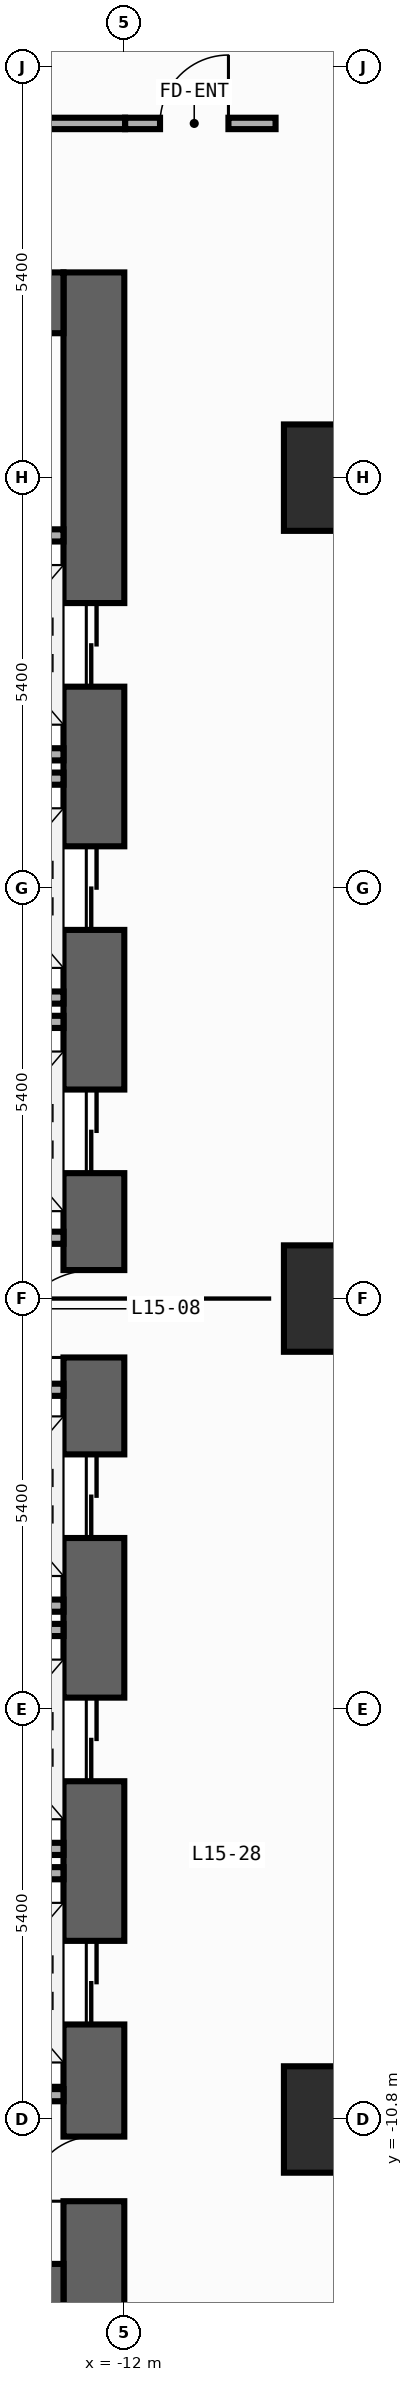
"""IFC4 building model, lengths in metres.
Left out: names, types, materials, properties, quantities, classifications, styles, units other than length and angle.
Written with IfcOpenShell. Run it as: python <this file> out.ifc"""

import sys

from ifc_helpers import new_model, si_unit, direction, frame, frame_2d, origin, origin_2d, place, context, subcontext, project, spatial, rectangle, extrude, element, fill, save


model = new_model("IFC4")
c1 = context("Model", 3, precision=1e-05, world=origin(), true_north=direction((0.0, 1.0)))
c2 = subcontext(c1, "Body", "Model", "MODEL_VIEW")
j1 = project(units=[si_unit("LENGTHUNIT", "METRE"), si_unit("PLANEANGLEUNIT", "RADIAN")], contexts=[c1])
p1 = place(None, origin())
s1 = spatial("IfcSite", under=j1, at=p1, CompositionType="ELEMENT")
p2 = place(p1, origin())
s2 = spatial("IfcBuilding", under=s1, at=p2, CompositionType="ELEMENT")
p3 = place(p2, frame((0.0, 0.0, 63.8)))
s3 = spatial("IfcBuildingStorey", under=s2, at=p3, CompositionType="ELEMENT", Elevation=63.8)
p4 = place(p3, frame((-12.4, -13.5, 0.0), z_axis=(0.0, 0.0, 1.0), x_axis=(0.0, 1.0, 0.0)))
e1 = element("IfcWall", 1, at=p4, inside=s3, PredefinedType="SHEAR", context=c2, shape_type="SweptSolid", body=[
    extrude(rectangle(XDim=27.0, YDim=0.8, at=frame_2d((13.5, 0.0))), origin(), (0.0, 0.0, 1.0), 3.94),
])
p5 = place(p4, frame((21.55, 0.0, 0.0)))
e2 = element("IfcOpeningElement", 2, at=p5, cuts=e1, PredefinedType="OPENING", context=c2, shape_type="SweptSolid", body=[
    extrude(rectangle(XDim=1.1, YDim=2.2, at=frame_2d((0.55, 1.1))), frame((0.0, 0.41, 0.0), z_axis=(0.0, -1.0, 0.0), x_axis=(1.0, 0.0, 0.0)), (0.0, 0.0, 1.0), 0.82),
])
p6 = place(p4, frame((18.35, 0.0, 0.0)))
e3 = element("IfcOpeningElement", 3, at=p6, cuts=e1, PredefinedType="OPENING", context=c2, shape_type="SweptSolid", body=[
    extrude(rectangle(XDim=1.1, YDim=2.2, at=frame_2d((0.55, 1.1))), frame((0.0, 0.41, 0.0), z_axis=(0.0, -1.0, 0.0), x_axis=(1.0, 0.0, 0.0)), (0.0, 0.0, 1.0), 0.82),
])
p7 = place(p4, frame((15.15, 0.0, 0.0)))
e4 = element("IfcOpeningElement", 4, at=p7, cuts=e1, PredefinedType="OPENING", context=c2, shape_type="SweptSolid", body=[
    extrude(rectangle(XDim=1.1, YDim=2.2, at=frame_2d((0.55, 1.1))), frame((0.0, 0.41, 0.0), z_axis=(0.0, -1.0, 0.0), x_axis=(1.0, 0.0, 0.0)), (0.0, 0.0, 1.0), 0.82),
])
p8 = place(p4, frame((10.35, 0.0, 0.0)))
e5 = element("IfcOpeningElement", 5, at=p8, cuts=e1, PredefinedType="OPENING", context=c2, shape_type="SweptSolid", body=[
    extrude(rectangle(XDim=1.1, YDim=2.2, at=frame_2d((0.55, 1.1))), frame((0.0, 0.41, 0.0), z_axis=(0.0, -1.0, 0.0), x_axis=(1.0, 0.0, 0.0)), (0.0, 0.0, 1.0), 0.82),
])
p9 = place(p4, frame((7.15, 0.0, 0.0)))
e6 = element("IfcOpeningElement", 6, at=p9, cuts=e1, PredefinedType="OPENING", context=c2, shape_type="SweptSolid", body=[
    extrude(rectangle(XDim=1.1, YDim=2.2, at=frame_2d((0.55, 1.1))), frame((0.0, 0.41, 0.0), z_axis=(0.0, -1.0, 0.0), x_axis=(1.0, 0.0, 0.0)), (0.0, 0.0, 1.0), 0.82),
])
p10 = place(p4, frame((3.95, 0.0, 0.0)))
e7 = element("IfcOpeningElement", 7, at=p10, cuts=e1, PredefinedType="OPENING", context=c2, shape_type="SweptSolid", body=[
    extrude(rectangle(XDim=1.1, YDim=2.2, at=frame_2d((0.55, 1.1))), frame((0.0, 0.41, 0.0), z_axis=(0.0, -1.0, 0.0), x_axis=(1.0, 0.0, 0.0)), (0.0, 0.0, 1.0), 0.82),
])
p11 = place(p4, frame((12.725, 0.0, 0.0)))
e8 = element("IfcOpeningElement", 8, at=p11, cuts=e1, PredefinedType="OPENING", context=c2, shape_type="SweptSolid", body=[
    extrude(rectangle(XDim=1.15, YDim=2.2, at=frame_2d((0.575, 1.1))), frame((0.0, 0.41, 0.0), z_axis=(0.0, -1.0, 0.0), x_axis=(1.0, 0.0, 0.0)), (0.0, 0.0, 1.0), 0.82),
])
p12 = place(p4, frame((1.625, 0.0, 0.0)))
e9 = element("IfcOpeningElement", 9, at=p12, cuts=e1, PredefinedType="OPENING", context=c2, shape_type="SweptSolid", body=[
    extrude(rectangle(XDim=0.85, YDim=2.1, at=frame_2d((0.425, 1.05))), frame((0.0, 0.41, 0.0), z_axis=(0.0, -1.0, 0.0), x_axis=(1.0, 0.0, 0.0)), (0.0, 0.0, 1.0), 0.82),
])
for number, where, z_axis, x_axis in (
    (10, (-19.6, -13.1, 0.0), (0.0, 0.0, 1.0), (1.0, 0.0, 0.0)),
    (11, (-19.6, 13.1, 0.0), (0.0, 0.0, 1.0), (1.0, 0.0, 0.0)),
):
    element("IfcWall", number, at=place(p3, frame(where, z_axis=z_axis, x_axis=x_axis)), inside=s3, PredefinedType="SHEAR", context=c2, shape_type="SweptSolid", body=[
        extrude(rectangle(XDim=6.8, YDim=0.8, at=frame_2d((3.4, 0.0))), origin(), (0.0, 0.0, 1.0), 3.94),
    ])
for number, where, z_axis, x_axis in (
    (12, (-9.2, -10.8, 0.0), (0.0, 0.0, 1.0), (1.0, 0.0, 0.0)),
    (13, (-9.2, 0.0, 0.0), (0.0, 0.0, 1.0), (1.0, 0.0, 0.0)),
    (14, (-9.2, 10.8, 0.0), (0.0, 0.0, 1.0), (1.0, 0.0, 0.0)),
):
    element("IfcColumn", number, at=place(p3, frame(where, z_axis=z_axis, x_axis=x_axis)), inside=s3, PredefinedType="COLUMN", context=c2, shape_type="SweptSolid", body=[
        extrude(rectangle(XDim=1.4, YDim=1.4, at=origin_2d()), origin(), (0.0, 0.0, 1.0), 4.2),
    ])
for number, where, z_axis, x_axis in (
    (15, (-14.99, 7.16, 0.0), (0.0, 0.0, 1.0), (1.0, 0.0, 0.0)),
    (16, (-14.99, 10.04, 0.0), (0.0, 0.0, 1.0), (1.0, 0.0, 0.0)),
    (17, (-14.99, 3.96, 0.0), (0.0, 0.0, 1.0), (1.0, 0.0, 0.0)),
    (18, (-14.99, 6.84, 0.0), (0.0, 0.0, 1.0), (1.0, 0.0, 0.0)),
    (19, (-14.99, 3.64, 0.0), (0.0, 0.0, 1.0), (1.0, 0.0, 0.0)),
    (20, (-14.99, -4.04, 0.0), (0.0, 0.0, 1.0), (1.0, 0.0, 0.0)),
    (21, (-14.99, -7.24, 0.0), (0.0, 0.0, 1.0), (1.0, 0.0, 0.0)),
    (22, (-14.99, -4.36, 0.0), (0.0, 0.0, 1.0), (1.0, 0.0, 0.0)),
    (23, (-14.99, -7.56, 0.0), (0.0, 0.0, 1.0), (1.0, 0.0, 0.0)),
):
    element("IfcWall", number, at=place(p3, frame(where, z_axis=z_axis, x_axis=x_axis)), inside=s3, PredefinedType="STANDARD", context=c2, shape_type="SweptSolid", body=[
        extrude(rectangle(XDim=2.19, YDim=0.16, at=frame_2d((1.095, 0.0))), origin(), (0.0, 0.0, 1.0), 3.94),
    ])
for number, where, z_axis, x_axis in (
    (24, (-15.4, 0.8, 0.0), (0.0, 0.0, 1.0), (1.0, 0.0, 0.0)),
    (25, (-15.4, -1.2, 0.0), (0.0, 0.0, 1.0), (1.0, 0.0, 0.0)),
    (26, (-15.4, -10.48, 0.0), (0.0, 0.0, 1.0), (1.0, 0.0, 0.0)),
):
    element("IfcWall", number, at=place(p3, frame(where, z_axis=z_axis, x_axis=x_axis)), inside=s3, PredefinedType="STANDARD", context=c2, shape_type="SweptSolid", body=[
        extrude(rectangle(XDim=2.6, YDim=0.16, at=frame_2d((1.3, 0.0))), origin(), (0.0, 0.0, 1.0), 3.94),
    ])
p13 = place(p3, frame((-11.99, 15.46, 0.0), z_axis=(0.0, 0.0, 1.0), x_axis=(1.0, 0.0, 0.0)))
e27 = element("IfcWall", 27, at=p13, inside=s3, PredefinedType="PARTITIONING", context=c2, shape_type="SweptSolid", body=[
    extrude(rectangle(XDim=1.98, YDim=0.15, at=frame_2d((0.99, 0.0))), origin(), (0.0, 0.0, 1.0), 3.94),
])
p14 = place(p13, frame((0.46, 0.0, 0.0)))
e28 = element("IfcOpeningElement", 28, at=p14, cuts=e27, PredefinedType="OPENING", context=c2, shape_type="SweptSolid", body=[
    extrude(rectangle(XDim=0.9, YDim=2.15, at=frame_2d((0.45, 1.075))), frame((0.0, 0.085, 0.0), z_axis=(0.0, -1.0, 0.0), x_axis=(1.0, 0.0, 0.0)), (0.0, 0.0, 1.0), 0.17),
])
p15 = place(p3, frame((-20.64, 15.46, 0.0), z_axis=(0.0, 0.0, 1.0), x_axis=(1.0, 0.0, 0.0)))
e29 = element("IfcWall", 29, at=p15, inside=s3, PredefinedType="PARTITIONING", context=c2, shape_type="SweptSolid", body=[
    extrude(rectangle(XDim=8.65, YDim=0.15, at=frame_2d((4.325, 0.0))), origin(), (0.0, 0.0, 1.0), 3.94),
])
p16 = place(p15, frame((2.871, 0.0, 0.0)))
e30 = element("IfcOpeningElement", 30, at=p16, cuts=e29, PredefinedType="OPENING", context=c2, shape_type="SweptSolid", body=[
    extrude(rectangle(XDim=0.9, YDim=2.15, at=frame_2d((0.45, 1.075))), frame((0.0, 0.085, 0.0), z_axis=(0.0, -1.0, 0.0), x_axis=(1.0, 0.0, 0.0)), (0.0, 0.0, 1.0), 0.17),
])
p17 = place(p5, origin())
e31 = element("IfcDoor", 31, at=p17, inside=s3, OperationType="DOUBLE_DOOR_SLIDING", PredefinedType="DOOR", context=c2, shape_type="SweptSolid", body=[
    extrude(rectangle(XDim=1.1, YDim=2.2, at=frame_2d((0.55, 1.1))), frame((0.0, 0.025, 0.0), z_axis=(0.0, -1.0, 0.0), x_axis=(1.0, 0.0, 0.0)), (0.0, 0.0, 1.0), 0.05),
])
fill(e2, e31)
p18 = place(p6, origin())
e32 = element("IfcDoor", 32, at=p18, inside=s3, OperationType="DOUBLE_DOOR_SLIDING", PredefinedType="DOOR", context=c2, shape_type="SweptSolid", body=[
    extrude(rectangle(XDim=1.1, YDim=2.2, at=frame_2d((0.55, 1.1))), frame((0.0, 0.025, 0.0), z_axis=(0.0, -1.0, 0.0), x_axis=(1.0, 0.0, 0.0)), (0.0, 0.0, 1.0), 0.05),
])
fill(e3, e32)
p19 = place(p7, origin())
e33 = element("IfcDoor", 33, at=p19, inside=s3, OperationType="DOUBLE_DOOR_SLIDING", PredefinedType="DOOR", context=c2, shape_type="SweptSolid", body=[
    extrude(rectangle(XDim=1.1, YDim=2.2, at=frame_2d((0.55, 1.1))), frame((0.0, 0.025, 0.0), z_axis=(0.0, -1.0, 0.0), x_axis=(1.0, 0.0, 0.0)), (0.0, 0.0, 1.0), 0.05),
])
fill(e4, e33)
p20 = place(p8, origin())
e34 = element("IfcDoor", 34, at=p20, inside=s3, OperationType="DOUBLE_DOOR_SLIDING", PredefinedType="DOOR", context=c2, shape_type="SweptSolid", body=[
    extrude(rectangle(XDim=1.1, YDim=2.2, at=frame_2d((0.55, 1.1))), frame((0.0, 0.025, 0.0), z_axis=(0.0, -1.0, 0.0), x_axis=(1.0, 0.0, 0.0)), (0.0, 0.0, 1.0), 0.05),
])
fill(e5, e34)
p21 = place(p9, origin())
e35 = element("IfcDoor", 35, at=p21, inside=s3, OperationType="DOUBLE_DOOR_SLIDING", PredefinedType="DOOR", context=c2, shape_type="SweptSolid", body=[
    extrude(rectangle(XDim=1.1, YDim=2.2, at=frame_2d((0.55, 1.1))), frame((0.0, 0.025, 0.0), z_axis=(0.0, -1.0, 0.0), x_axis=(1.0, 0.0, 0.0)), (0.0, 0.0, 1.0), 0.05),
])
fill(e6, e35)
p22 = place(p10, origin())
e36 = element("IfcDoor", 36, at=p22, inside=s3, OperationType="DOUBLE_DOOR_SLIDING", PredefinedType="DOOR", context=c2, shape_type="SweptSolid", body=[
    extrude(rectangle(XDim=1.1, YDim=2.2, at=frame_2d((0.55, 1.1))), frame((0.0, 0.025, 0.0), z_axis=(0.0, -1.0, 0.0), x_axis=(1.0, 0.0, 0.0)), (0.0, 0.0, 1.0), 0.05),
])
fill(e7, e36)
p23 = place(p11, origin())
e37 = element("IfcDoor", 37, at=p23, inside=s3, OperationType="SINGLE_SWING_LEFT", PredefinedType="DOOR", context=c2, shape_type="SweptSolid", body=[
    extrude(rectangle(XDim=1.15, YDim=2.2, at=frame_2d((0.575, 1.1))), frame((0.0, 0.025, 0.0), z_axis=(0.0, -1.0, 0.0), x_axis=(1.0, 0.0, 0.0)), (0.0, 0.0, 1.0), 0.05),
])
fill(e8, e37)
p24 = place(p12, origin())
e38 = element("IfcDoor", 38, at=p24, inside=s3, OperationType="SINGLE_SWING_LEFT", PredefinedType="DOOR", context=c2, shape_type="SweptSolid", body=[
    extrude(rectangle(XDim=0.85, YDim=2.1, at=frame_2d((0.425, 1.05))), frame((0.0, 0.025, 0.0), z_axis=(0.0, -1.0, 0.0), x_axis=(1.0, 0.0, 0.0)), (0.0, 0.0, 1.0), 0.05),
])
fill(e9, e38)
p25 = place(p14, origin())
e39 = element("IfcDoor", 39, at=p25, inside=s3, OperationType="SINGLE_SWING_RIGHT", PredefinedType="DOOR", context=c2, shape_type="SweptSolid", body=[
    extrude(rectangle(XDim=0.9, YDim=2.15, at=frame_2d((0.45, 1.075))), frame((0.0, 0.025, 0.0), z_axis=(0.0, -1.0, 0.0), x_axis=(1.0, 0.0, 0.0)), (0.0, 0.0, 1.0), 0.05),
])
fill(e28, e39)
save(model, sys.argv[1])
